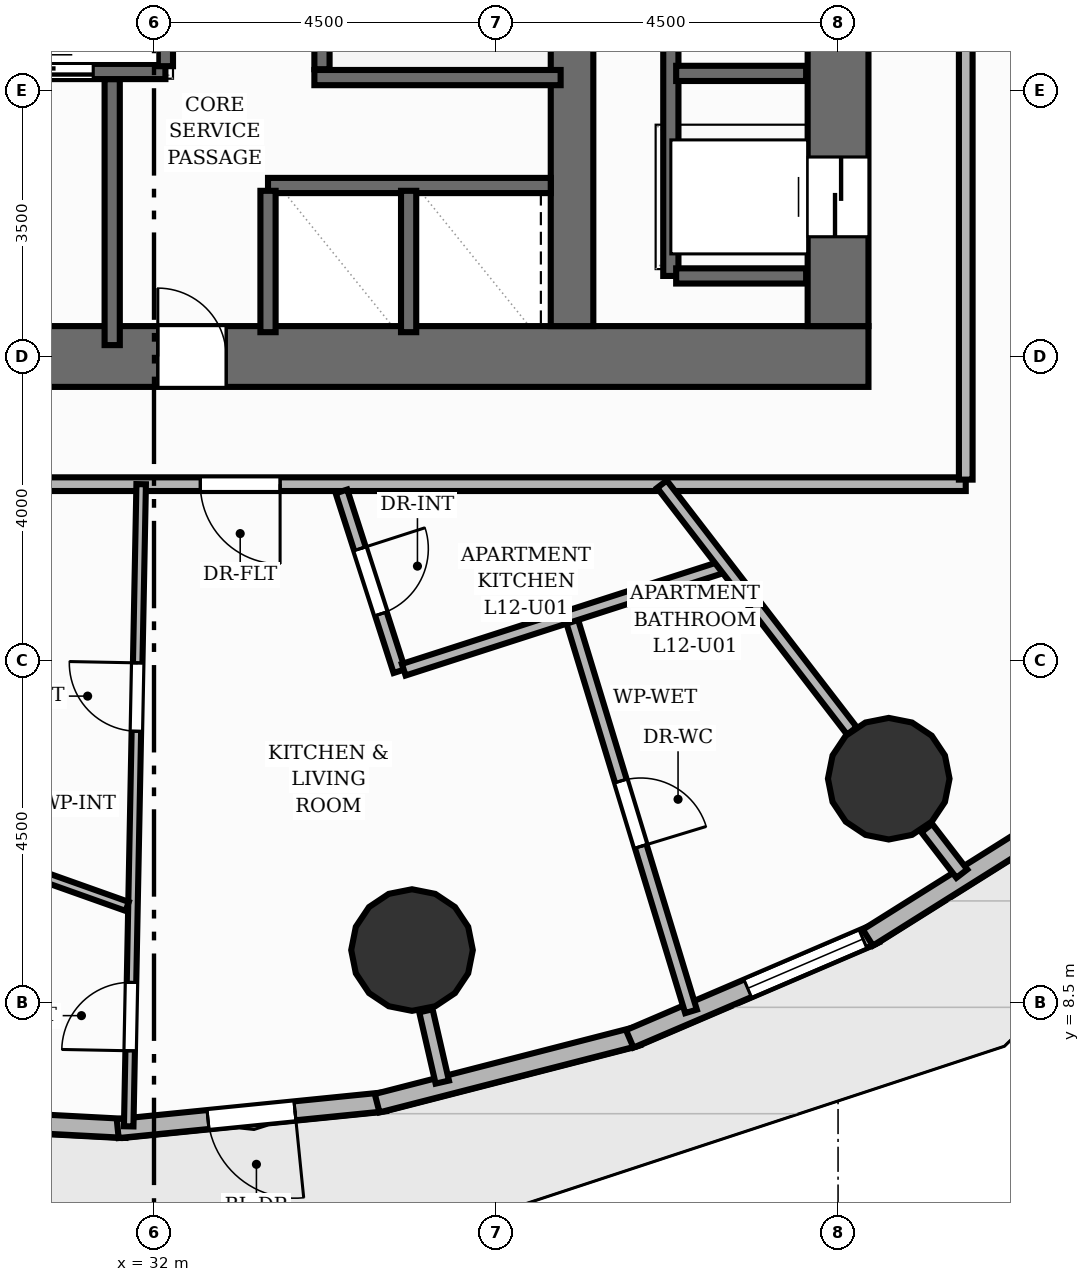
"""IFC4 building model, lengths in metres.
Left out: names, types, materials, properties, quantities, classifications, styles, units other than length and angle.
Written with IfcOpenShell. Run it as: python <this file> out.ifc"""

import sys

from ifc_helpers import new_model, si_unit, direction, frame, frame_2d, origin, origin_2d, place, context, subcontext, project, spatial, rectangle, circle, extrude, element, fill, save


model = new_model("IFC4")
c1 = context("Model", 3, precision=1e-05, world=origin(), true_north=direction((0.0, 1.0)))
c2 = subcontext(c1, "Body", "Model", "MODEL_VIEW")
j1 = project(units=[si_unit("LENGTHUNIT", "METRE"), si_unit("PLANEANGLEUNIT", "RADIAN")], contexts=[c1])
p1 = place(None, origin())
s1 = spatial("IfcSite", under=j1, at=p1, CompositionType="ELEMENT")
p2 = place(p1, origin())
s2 = spatial("IfcBuilding", under=s1, at=p2, CompositionType="ELEMENT")
p3 = place(p2, frame((0.0, 0.0, 44.0)))
s3 = spatial("IfcBuildingStorey", under=s2, at=p3, CompositionType="ELEMENT", Elevation=44.0)
p4 = place(p3, frame((22.6, 17.0, 0.0), z_axis=(0.0, 0.0, 1.0), x_axis=(1.0, 0.0, 0.0)))
e1 = element("IfcWall", 1, at=p4, inside=s3, PredefinedType="SHEAR", context=c2, shape_type="SweptSolid", body=[
    extrude(rectangle(XDim=18.8, YDim=0.8, at=frame_2d((9.4, 0.0))), origin(), (0.0, 0.0, 1.0), 3.2),
])
p5 = place(p4, frame((5.9, 0.0, 0.0)))
e2 = element("IfcOpeningElement", 2, at=p5, cuts=e1, PredefinedType="OPENING", context=c2, shape_type="SweptSolid", body=[
    extrude(rectangle(XDim=1.1, YDim=2.15, at=frame_2d((0.55, 1.075))), frame((0.0, 0.41, 0.0), z_axis=(0.0, -1.0, 0.0), x_axis=(1.0, 0.0, 0.0)), (0.0, 0.0, 1.0), 0.82),
])
p6 = place(p4, frame((9.45, 0.0, 0.0)))
e3 = element("IfcOpeningElement", 3, at=p6, cuts=e1, PredefinedType="OPENING", context=c2, shape_type="SweptSolid", body=[
    extrude(rectangle(XDim=0.9, YDim=2.1, at=frame_2d((0.45, 1.05))), frame((0.0, 0.41, 0.0), z_axis=(0.0, -1.0, 0.0), x_axis=(1.0, 0.0, 0.0)), (0.0, 0.0, 1.0), 0.82),
])
p7 = place(p3, frame((41.0, 17.4, 0.0), z_axis=(0.0, 0.0, 1.0), x_axis=(0.0, 1.0, 0.0)))
e4 = element("IfcWall", 4, at=p7, inside=s3, PredefinedType="SHEAR", context=c2, shape_type="SweptSolid", body=[
    extrude(rectangle(XDim=13.2, YDim=0.8, at=frame_2d((6.6, 0.0))), origin(), (0.0, 0.0, 1.0), 3.2),
])
p8 = place(p7, frame((1.175, 0.0, 0.0)))
e5 = element("IfcOpeningElement", 5, at=p8, cuts=e4, PredefinedType="OPENING", context=c2, shape_type="SweptSolid", body=[
    extrude(rectangle(XDim=1.05, YDim=2.15, at=frame_2d((0.525, 1.075))), frame((0.0, 0.41, 0.0), z_axis=(0.0, -1.0, 0.0), x_axis=(1.0, 0.0, 0.0)), (0.0, 0.0, 1.0), 0.82),
])
p9 = place(p7, frame((4.425, 0.0, 0.0)))
e6 = element("IfcOpeningElement", 6, at=p9, cuts=e4, PredefinedType="OPENING", context=c2, shape_type="SweptSolid", body=[
    extrude(rectangle(XDim=1.05, YDim=2.15, at=frame_2d((0.525, 1.075))), frame((0.0, 0.41, 0.0), z_axis=(0.0, -1.0, 0.0), x_axis=(1.0, 0.0, 0.0)), (0.0, 0.0, 1.0), 0.82),
])
p10 = place(p7, frame((7.725, 0.0, 0.0)))
e7 = element("IfcOpeningElement", 7, at=p10, cuts=e4, PredefinedType="OPENING", context=c2, shape_type="SweptSolid", body=[
    extrude(rectangle(XDim=1.05, YDim=2.15, at=frame_2d((0.525, 1.075))), frame((0.0, 0.41, 0.0), z_axis=(0.0, -1.0, 0.0), x_axis=(1.0, 0.0, 0.0)), (0.0, 0.0, 1.0), 0.82),
])
p11 = place(p7, frame((10.975, 0.0, 0.0)))
e8 = element("IfcOpeningElement", 8, at=p11, cuts=e4, PredefinedType="OPENING", context=c2, shape_type="SweptSolid", body=[
    extrude(rectangle(XDim=1.05, YDim=2.15, at=frame_2d((0.525, 1.075))), frame((0.0, 0.41, 0.0), z_axis=(0.0, -1.0, 0.0), x_axis=(1.0, 0.0, 0.0)), (0.0, 0.0, 1.0), 0.82),
])
p12 = place(p3, frame((37.5, 17.4, 0.0), z_axis=(0.0, 0.0, 1.0), x_axis=(0.0, 1.0, 0.0)))
e9 = element("IfcWall", 9, at=p12, inside=s3, PredefinedType="SHEAR", context=c2, shape_type="SweptSolid", body=[
    extrude(rectangle(XDim=13.2, YDim=0.56, at=frame_2d((6.6, 0.0))), origin(), (0.0, 0.0, 1.0), 3.2),
])
for number, where, z_axis, x_axis in (
    (10, (35.395, 9.19, 0.0), (0.0, 0.0, 1.0), (1.0, 0.0, 0.0)),
    (11, (41.667, 11.445, 0.0), (0.0, 0.0, 1.0), (1.0, 0.0, 0.0)),
):
    element("IfcColumn", number, at=place(p3, frame(where, z_axis=z_axis, x_axis=x_axis)), inside=s3, PredefinedType="COLUMN", context=c2, shape_type="SweptSolid", body=[
        extrude(circle(Radius=0.8, at=origin_2d()), origin(), (0.0, 0.0, 1.0), 3.2),
    ])
p13 = place(p3, frame((31.631, 6.844, 0.0), z_axis=(0.0, 0.0, 1.0), x_axis=(-0.99860782827, 0.052748510102, 0.0)))
e12 = element("IfcWall", 12, at=p13, inside=s3, PredefinedType="SOLIDWALL", context=c2, shape_type="SweptSolid", body=[
    extrude(rectangle(XDim=3.513, YDim=0.25, at=frame_2d((1.756, 0.0))), origin(), (0.0, 0.0, 1.0), 2.96),
])
p14 = place(p13, frame((1.056, 0.0, 0.85)))
e13 = element("IfcOpeningElement", 13, at=p14, cuts=e12, PredefinedType="OPENING", context=c2, shape_type="SweptSolid", body=[
    extrude(rectangle(XDim=1.4, YDim=1.55, at=frame_2d((0.7, 0.775))), frame((0.0, 0.135, 0.0), z_axis=(0.0, -1.0, 0.0), x_axis=(1.0, 0.0, 0.0)), (0.0, 0.0, 1.0), 0.27),
])
p15 = place(p3, frame((35.043, 7.194, 0.0), z_axis=(0.0, 0.0, 1.0), x_axis=(-0.994996115016, -0.099913618207, 0.0)))
e14 = element("IfcWall", 14, at=p15, inside=s3, PredefinedType="SOLIDWALL", context=c2, shape_type="SweptSolid", body=[
    extrude(rectangle(XDim=3.538, YDim=0.25, at=frame_2d((1.769, 0.0))), origin(), (0.0, 0.0, 1.0), 2.96),
])
p16 = place(p15, frame((1.194, 0.0, 0.0)))
e15 = element("IfcOpeningElement", 15, at=p16, cuts=e14, PredefinedType="OPENING", context=c2, shape_type="SweptSolid", body=[
    extrude(rectangle(XDim=1.15, YDim=2.2, at=frame_2d((0.575, 1.1))), frame((0.0, 0.135, 0.0), z_axis=(0.0, -1.0, 0.0), x_axis=(1.0, 0.0, 0.0)), (0.0, 0.0, 1.0), 0.27),
])
p17 = place(p3, frame((38.362, 8.057, 0.0), z_axis=(0.0, 0.0, 1.0), x_axis=(-0.968459637573, -0.249170484594, 0.0)))
e16 = element("IfcWall", 16, at=p17, inside=s3, PredefinedType="SOLIDWALL", context=c2, shape_type="SweptSolid", body=[
    extrude(rectangle(XDim=3.538, YDim=0.25, at=frame_2d((1.769, 0.0))), origin(), (0.0, 0.0, 1.0), 2.96),
])
p18 = place(p3, frame((41.489, 9.405, 0.0), z_axis=(0.0, 0.0, 1.0), x_axis=(-0.919263615987, -0.393642482872, 0.0)))
e17 = element("IfcWall", 17, at=p18, inside=s3, PredefinedType="SOLIDWALL", context=c2, shape_type="SweptSolid", body=[
    extrude(rectangle(XDim=3.513, YDim=0.25, at=frame_2d((1.756, 0.0))), origin(), (0.0, 0.0, 1.0), 2.96),
])
p19 = place(p18, frame((0.175, 0.0, 0.85)))
e18 = element("IfcOpeningElement", 18, at=p19, cuts=e17, PredefinedType="OPENING", context=c2, shape_type="SweptSolid", body=[
    extrude(rectangle(XDim=1.65, YDim=1.55, at=frame_2d((0.825, 0.775))), frame((0.0, 0.135, 0.0), z_axis=(0.0, -1.0, 0.0), x_axis=(1.0, 0.0, 0.0)), (0.0, 0.0, 1.0), 0.27),
])
p20 = place(p3, frame((44.326, 11.197, 0.0), z_axis=(0.0, 0.0, 1.0), x_axis=(-0.846852351865, -0.531828068215, 0.0)))
e19 = element("IfcWall", 19, at=p20, inside=s3, PredefinedType="SOLIDWALL", context=c2, shape_type="SweptSolid", body=[
    extrude(rectangle(XDim=3.465, YDim=0.25, at=frame_2d((1.732, 0.0))), origin(), (0.0, 0.0, 1.0), 2.96),
])
p21 = place(p3, frame((34.21, 20.78, 0.0), z_axis=(0.0, 0.0, 1.0), x_axis=(0.0, 1.0, 0.0)))
e20 = element("IfcWall", 20, at=p21, inside=s3, PredefinedType="SHEAR", context=c2, shape_type="SweptSolid", body=[
    extrude(rectangle(XDim=6.44, YDim=0.2, at=frame_2d((3.22, 0.0))), origin(), (0.0, 0.0, 1.0), 3.2),
])
p22 = place(p3, frame((34.11, 20.67, 0.0), z_axis=(0.0, 0.0, 1.0), x_axis=(1.0, 0.0, 0.0)))
e21 = element("IfcWall", 21, at=p22, inside=s3, PredefinedType="SHEAR", context=c2, shape_type="SweptSolid", body=[
    extrude(rectangle(XDim=3.24, YDim=0.2, at=frame_2d((1.62, 0.0))), origin(), (0.0, 0.0, 1.0), 3.2),
])
p23 = place(p3, frame((31.45, 17.15, 0.0), z_axis=(0.0, 0.0, 1.0), x_axis=(0.0, 1.0, 0.0)))
e22 = element("IfcWall", 22, at=p23, inside=s3, PredefinedType="SHEAR", context=c2, shape_type="SweptSolid", body=[
    extrude(rectangle(XDim=3.5, YDim=0.2, at=frame_2d((1.75, 0.0))), origin(), (0.0, 0.0, 1.0), 3.2),
])
p24 = place(p3, frame((29.85, 20.75, 0.0), z_axis=(0.0, 0.0, 1.0), x_axis=(1.0, 0.0, 0.0)))
e23 = element("IfcWall", 23, at=p24, inside=s3, PredefinedType="SHEAR", context=c2, shape_type="SweptSolid", body=[
    extrude(rectangle(XDim=2.3, YDim=0.2, at=frame_2d((1.15, 0.0))), origin(), (0.0, 0.0, 1.0), 3.2),
])
p25 = place(p24, frame((0.25, 0.0, 0.0)))
e24 = element("IfcOpeningElement", 24, at=p25, cuts=e23, PredefinedType="OPENING", context=c2, shape_type="SweptSolid", body=[
    extrude(rectangle(XDim=1.1, YDim=2.15, at=frame_2d((0.55, 1.075))), frame((0.0, 0.11, 0.0), z_axis=(0.0, -1.0, 0.0), x_axis=(1.0, 0.0, 0.0)), (0.0, 0.0, 1.0), 0.22),
])
p26 = place(p3, frame((32.15, 20.82, 0.0), z_axis=(0.0, 0.0, 1.0), x_axis=(0.0, 1.0, 0.0)))
e25 = element("IfcWall", 25, at=p26, inside=s3, PredefinedType="SHEAR", context=c2, shape_type="SweptSolid", body=[
    extrude(rectangle(XDim=1.71, YDim=0.2, at=frame_2d((0.855, 0.0))), origin(), (0.0, 0.0, 1.0), 3.2),
])
p27 = place(p3, frame((38.8, 18.06, 0.0), z_axis=(0.0, 0.0, 1.0), x_axis=(0.0, 1.0, 0.0)))
e26 = element("IfcWall", 26, at=p27, inside=s3, PredefinedType="SHEAR", context=c2, shape_type="SweptSolid", body=[
    extrude(rectangle(XDim=11.88, YDim=0.2, at=frame_2d((5.94, 0.0))), origin(), (0.0, 0.0, 1.0), 3.2),
])
for number, where, z_axis, x_axis in (
    (27, (38.87, 18.06, 0.0), (0.0, 0.0, 1.0), (1.0, 0.0, 0.0)),
    (28, (38.87, 20.725, 0.0), (0.0, 0.0, 1.0), (1.0, 0.0, 0.0)),
):
    element("IfcWall", number, at=place(p3, frame(where, z_axis=z_axis, x_axis=x_axis)), inside=s3, PredefinedType="SHEAR", context=c2, shape_type="SweptSolid", body=[
        extrude(rectangle(XDim=1.71, YDim=0.2, at=frame_2d((0.855, 0.0))), origin(), (0.0, 0.0, 1.0), 3.2),
    ])
p28 = place(p3, frame((33.5, 19.25, 0.0), z_axis=(0.0, 0.0, 1.0), x_axis=(1.0, 0.0, 0.0)))
e29 = element("IfcWall", 29, at=p28, inside=s3, PredefinedType="SHEAR", context=c2, shape_type="SweptSolid", body=[
    extrude(rectangle(XDim=3.72, YDim=0.2, at=frame_2d((1.86, 0.0))), origin(), (0.0, 0.0, 1.0), 3.2),
])
for number, where, z_axis, x_axis in (
    (30, (33.5, 17.32, 0.0), (0.0, 0.0, 1.0), (0.0, 1.0, 0.0)),
    (31, (35.35, 17.32, 0.0), (0.0, 0.0, 1.0), (0.0, 1.0, 0.0)),
):
    element("IfcWall", number, at=place(p3, frame(where, z_axis=z_axis, x_axis=x_axis)), inside=s3, PredefinedType="SHEAR", context=c2, shape_type="SweptSolid", body=[
        extrude(rectangle(XDim=1.86, YDim=0.2, at=frame_2d((0.93, 0.0))), origin(), (0.0, 0.0, 1.0), 3.2),
    ])
p29 = place(p3, frame((35.578, 8.391, 0.0), z_axis=(0.0, 0.0, 1.0), x_axis=(0.223210471103, -0.974770273239, 0.0)))
e32 = element("IfcWall", 32, at=p29, inside=s3, PredefinedType="PARTITIONING", context=c2, shape_type="SweptSolid", body=[
    extrude(rectangle(XDim=0.962, YDim=0.18, at=frame_2d((0.481, 0.0))), origin(), (0.0, 0.0, 1.0), 2.178),
])
p30 = place(p3, frame((42.167, 10.795, 0.0), z_axis=(0.0, 0.0, 1.0), x_axis=(0.610022678174, -0.792383954982, 0.0)))
e33 = element("IfcWall", 33, at=p30, inside=s3, PredefinedType="PARTITIONING", context=c2, shape_type="SweptSolid", body=[
    extrude(rectangle(XDim=0.756, YDim=0.18, at=frame_2d((0.378, 0.0))), origin(), (0.0, 0.0, 1.0), 2.178),
])
p31 = place(p3, frame((42.68, 15.32, 0.0), z_axis=(0.0, 0.0, 1.0), x_axis=(-1.0, 0.0, 0.0)))
e34 = element("IfcWall", 34, at=p31, inside=s3, PredefinedType="PARTITIONING", context=c2, shape_type="SweptSolid", body=[
    extrude(rectangle(XDim=21.24, YDim=0.18, at=frame_2d((10.62, 0.0))), origin(), (0.0, 0.0, 1.0), 2.955),
])
p32 = place(p31, frame((9.021, 0.0, 0.0)))
e35 = element("IfcOpeningElement", 35, at=p32, cuts=e34, PredefinedType="OPENING", context=c2, shape_type="SweptSolid", body=[
    extrude(rectangle(XDim=1.05, YDim=2.15, at=frame_2d((0.525, 1.075))), frame((0.0, 0.1, 0.0), z_axis=(0.0, -1.0, 0.0), x_axis=(1.0, 0.0, 0.0)), (0.0, 0.0, 1.0), 0.2),
])
p33 = place(p3, frame((42.68, 32.62, 0.0), z_axis=(0.0, 0.0, 1.0), x_axis=(0.0, -1.0, 0.0)))
e36 = element("IfcWall", 36, at=p33, inside=s3, PredefinedType="PARTITIONING", context=c2, shape_type="SweptSolid", body=[
    extrude(rectangle(XDim=17.24, YDim=0.18, at=frame_2d((8.62, 0.0))), origin(), (0.0, 0.0, 1.0), 2.955),
])
p34 = place(p33, frame((8.095, 0.0, 0.0)))
e37 = element("IfcOpeningElement", 37, at=p34, cuts=e36, PredefinedType="OPENING", context=c2, shape_type="SweptSolid", body=[
    extrude(rectangle(XDim=1.05, YDim=2.15, at=frame_2d((0.525, 1.075))), frame((0.0, 0.1, 0.0), z_axis=(0.0, -1.0, 0.0), x_axis=(1.0, 0.0, 0.0)), (0.0, 0.0, 1.0), 0.2),
])
p35 = place(p3, frame((37.481, 13.586, 0.0), z_axis=(0.0, 0.0, 1.0), x_axis=(0.291381320828, -0.956606986109, 0.0)))
e38 = element("IfcWall", 38, at=p35, inside=s3, PredefinedType="PLUMBINGWALL", context=c2, shape_type="SweptSolid", body=[
    extrude(rectangle(XDim=5.439, YDim=0.16, at=frame_2d((2.719, 0.0))), origin(), (0.0, 0.0, 1.0), 2.955),
])
p36 = place(p35, frame((2.269, 0.0, 0.0)))
e39 = element("IfcOpeningElement", 39, at=p36, cuts=e38, PredefinedType="OPENING", context=c2, shape_type="SweptSolid", body=[
    extrude(rectangle(XDim=0.9, YDim=2.1, at=frame_2d((0.45, 1.05))), frame((0.0, 0.09, 0.0), z_axis=(0.0, -1.0, 0.0), x_axis=(1.0, 0.0, 0.0)), (0.0, 0.0, 1.0), 0.18),
])
p37 = place(p3, frame((31.667, 6.871, 0.0), z_axis=(0.0, 0.0, 1.0), x_axis=(0.019442133322, 0.999810983862, 0.0)))
e40 = element("IfcWall", 40, at=p37, inside=s3, PredefinedType="PARTITIONING", context=c2, shape_type="SweptSolid", body=[
    extrude(rectangle(XDim=8.451, YDim=0.125, at=frame_2d((4.226, 0.0))), origin(), (0.0, 0.0, 1.0), 2.955),
])
p38 = place(p37, frame((0.994, 0.0, 0.0)))
e41 = element("IfcOpeningElement", 41, at=p38, cuts=e40, PredefinedType="OPENING", context=c2, shape_type="SweptSolid", body=[
    extrude(rectangle(XDim=0.9, YDim=2.1, at=frame_2d((0.45, 1.05))), frame((0.0, 0.073, 0.0), z_axis=(0.0, -1.0, 0.0), x_axis=(1.0, 0.0, 0.0)), (0.0, 0.0, 1.0), 0.145),
])
p39 = place(p37, frame((5.199, 0.0, 0.0)))
e42 = element("IfcOpeningElement", 42, at=p39, cuts=e40, PredefinedType="OPENING", context=c2, shape_type="SweptSolid", body=[
    extrude(rectangle(XDim=0.9, YDim=2.1, at=frame_2d((0.45, 1.05))), frame((0.0, 0.073, 0.0), z_axis=(0.0, -1.0, 0.0), x_axis=(1.0, 0.0, 0.0)), (0.0, 0.0, 1.0), 0.145),
])
p40 = place(p3, frame((34.466, 15.225, 0.0), z_axis=(0.0, 0.0, 1.0), x_axis=(0.306778830533, -0.95178083041, 0.0)))
e43 = element("IfcWall", 43, at=p40, inside=s3, PredefinedType="PLUMBINGWALL", context=c2, shape_type="SweptSolid", body=[
    extrude(rectangle(XDim=2.485, YDim=0.16, at=frame_2d((1.242, 0.0))), origin(), (0.0, 0.0, 1.0), 2.955),
])
p41 = place(p40, frame((0.792, 0.0, 0.0)))
e44 = element("IfcOpeningElement", 44, at=p41, cuts=e43, PredefinedType="OPENING", context=c2, shape_type="SweptSolid", body=[
    extrude(rectangle(XDim=0.9, YDim=2.1, at=frame_2d((0.45, 1.05))), frame((0.0, 0.09, 0.0), z_axis=(0.0, -1.0, 0.0), x_axis=(1.0, 0.0, 0.0)), (0.0, 0.0, 1.0), 0.18),
])
p42 = place(p3, frame((35.285, 12.878, 0.0), z_axis=(0.0, 0.0, 1.0), x_axis=(0.951790418206, 0.306749082819, 0.0)))
e45 = element("IfcWall", 45, at=p42, inside=s3, PredefinedType="PLUMBINGWALL", context=c2, shape_type="SweptSolid", body=[
    extrude(rectangle(XDim=4.443, YDim=0.16, at=frame_2d((2.221, 0.0))), origin(), (0.0, 0.0, 1.0), 2.955),
])
p43 = place(p3, frame((38.683, 15.32, 0.0), z_axis=(0.0, 0.0, 1.0), x_axis=(0.61008798772, -0.792333671656, 0.0)))
e46 = element("IfcWall", 46, at=p43, inside=s3, PredefinedType="PLUMBINGWALL", context=c2, shape_type="SweptSolid", body=[
    extrude(rectangle(XDim=4.097, YDim=0.16, at=frame_2d((2.048, 0.0))), origin(), (0.0, 0.0, 1.0), 2.178),
])
p44 = place(p3, frame((23.319, 12.725, 0.0), z_axis=(0.0, 0.0, 1.0), x_axis=(0.942235806182, -0.334950273248, 0.0)))
e47 = element("IfcWall", 47, at=p44, inside=s3, PredefinedType="PARTITIONING", context=c2, shape_type="SweptSolid", body=[
    extrude(rectangle(XDim=8.839, YDim=0.125, at=frame_2d((4.419, 0.0))), origin(), (0.0, 0.0, 1.0), 2.955),
])
p45 = place(p16, origin())
e48 = element("IfcDoor", 48, at=p45, inside=s3, OperationType="SINGLE_SWING_LEFT", PredefinedType="DOOR", context=c2, shape_type="SweptSolid", body=[
    extrude(rectangle(XDim=1.15, YDim=2.2, at=frame_2d((0.575, 1.1))), frame((0.0, 0.025, 0.0), z_axis=(0.0, -1.0, 0.0), x_axis=(1.0, 0.0, 0.0)), (0.0, 0.0, 1.0), 0.05),
])
fill(e15, e48)
p46 = place(p19, origin())
e49 = element("IfcWindow", 49, at=p46, inside=s3, PartitioningType="SINGLE_PANEL", PredefinedType="WINDOW", context=c2, shape_type="SweptSolid", body=[
    extrude(rectangle(XDim=1.65, YDim=1.55, at=frame_2d((0.825, 0.775))), frame((0.0, 0.03, 0.0), z_axis=(0.0, -1.0, 0.0), x_axis=(1.0, 0.0, 0.0)), (0.0, 0.0, 1.0), 0.06),
])
fill(e18, e49)
p47 = place(p25, origin())
e50 = element("IfcDoor", 50, at=p47, inside=s3, OperationType="DOUBLE_DOOR_SLIDING", PredefinedType="DOOR", context=c2, shape_type="SweptSolid", body=[
    extrude(rectangle(XDim=1.1, YDim=2.15, at=frame_2d((0.55, 1.075))), frame((0.0, 0.025, 0.0), z_axis=(0.0, -1.0, 0.0), x_axis=(1.0, 0.0, 0.0)), (0.0, 0.0, 1.0), 0.05),
])
fill(e24, e50)
p48 = place(p8, origin())
e51 = element("IfcDoor", 51, at=p48, inside=s3, OperationType="DOUBLE_DOOR_SLIDING", PredefinedType="DOOR", context=c2, shape_type="SweptSolid", body=[
    extrude(rectangle(XDim=1.05, YDim=2.15, at=frame_2d((0.525, 1.075))), frame((0.0, 0.025, 0.0), z_axis=(0.0, -1.0, 0.0), x_axis=(1.0, 0.0, 0.0)), (0.0, 0.0, 1.0), 0.05),
])
fill(e5, e51)
p49 = place(p6, origin())
e52 = element("IfcDoor", 52, at=p49, inside=s3, OperationType="SINGLE_SWING_LEFT", PredefinedType="DOOR", context=c2, shape_type="SweptSolid", body=[
    extrude(rectangle(XDim=0.9, YDim=2.1, at=frame_2d((0.45, 1.05))), frame((0.0, 0.025, 0.0), z_axis=(0.0, -1.0, 0.0), x_axis=(1.0, 0.0, 0.0)), (0.0, 0.0, 1.0), 0.05),
])
fill(e3, e52)
p50 = place(p32, origin())
e53 = element("IfcDoor", 53, at=p50, inside=s3, OperationType="SINGLE_SWING_LEFT", PredefinedType="DOOR", context=c2, shape_type="SweptSolid", body=[
    extrude(rectangle(XDim=1.05, YDim=2.15, at=frame_2d((0.525, 1.075))), frame((0.0, 0.025, 0.0), z_axis=(0.0, -1.0, 0.0), x_axis=(1.0, 0.0, 0.0)), (0.0, 0.0, 1.0), 0.05),
])
fill(e35, e53)
p51 = place(p36, origin())
e54 = element("IfcDoor", 54, at=p51, inside=s3, OperationType="SINGLE_SWING_RIGHT", PredefinedType="DOOR", context=c2, shape_type="SweptSolid", body=[
    extrude(rectangle(XDim=0.9, YDim=2.1, at=frame_2d((0.45, 1.05))), frame((0.0, 0.025, 0.0), z_axis=(0.0, -1.0, 0.0), x_axis=(1.0, 0.0, 0.0)), (0.0, 0.0, 1.0), 0.05),
])
fill(e39, e54)
p52 = place(p38, origin())
e55 = element("IfcDoor", 55, at=p52, inside=s3, OperationType="SINGLE_SWING_LEFT", PredefinedType="DOOR", context=c2, shape_type="SweptSolid", body=[
    extrude(rectangle(XDim=0.9, YDim=2.1, at=frame_2d((0.45, 1.05))), frame((0.0, 0.025, 0.0), z_axis=(0.0, -1.0, 0.0), x_axis=(1.0, 0.0, 0.0)), (0.0, 0.0, 1.0), 0.05),
])
fill(e41, e55)
p53 = place(p39, origin())
e56 = element("IfcDoor", 56, at=p53, inside=s3, OperationType="SINGLE_SWING_RIGHT", PredefinedType="DOOR", context=c2, shape_type="SweptSolid", body=[
    extrude(rectangle(XDim=0.9, YDim=2.1, at=frame_2d((0.45, 1.05))), frame((0.0, 0.025, 0.0), z_axis=(0.0, -1.0, 0.0), x_axis=(1.0, 0.0, 0.0)), (0.0, 0.0, 1.0), 0.05),
])
fill(e42, e56)
p54 = place(p41, origin())
e57 = element("IfcDoor", 57, at=p54, inside=s3, OperationType="SINGLE_SWING_LEFT", PredefinedType="DOOR", context=c2, shape_type="SweptSolid", body=[
    extrude(rectangle(XDim=0.9, YDim=2.1, at=frame_2d((0.45, 1.05))), frame((0.0, 0.025, 0.0), z_axis=(0.0, -1.0, 0.0), x_axis=(1.0, 0.0, 0.0)), (0.0, 0.0, 1.0), 0.05),
])
fill(e44, e57)
save(model, sys.argv[1])
